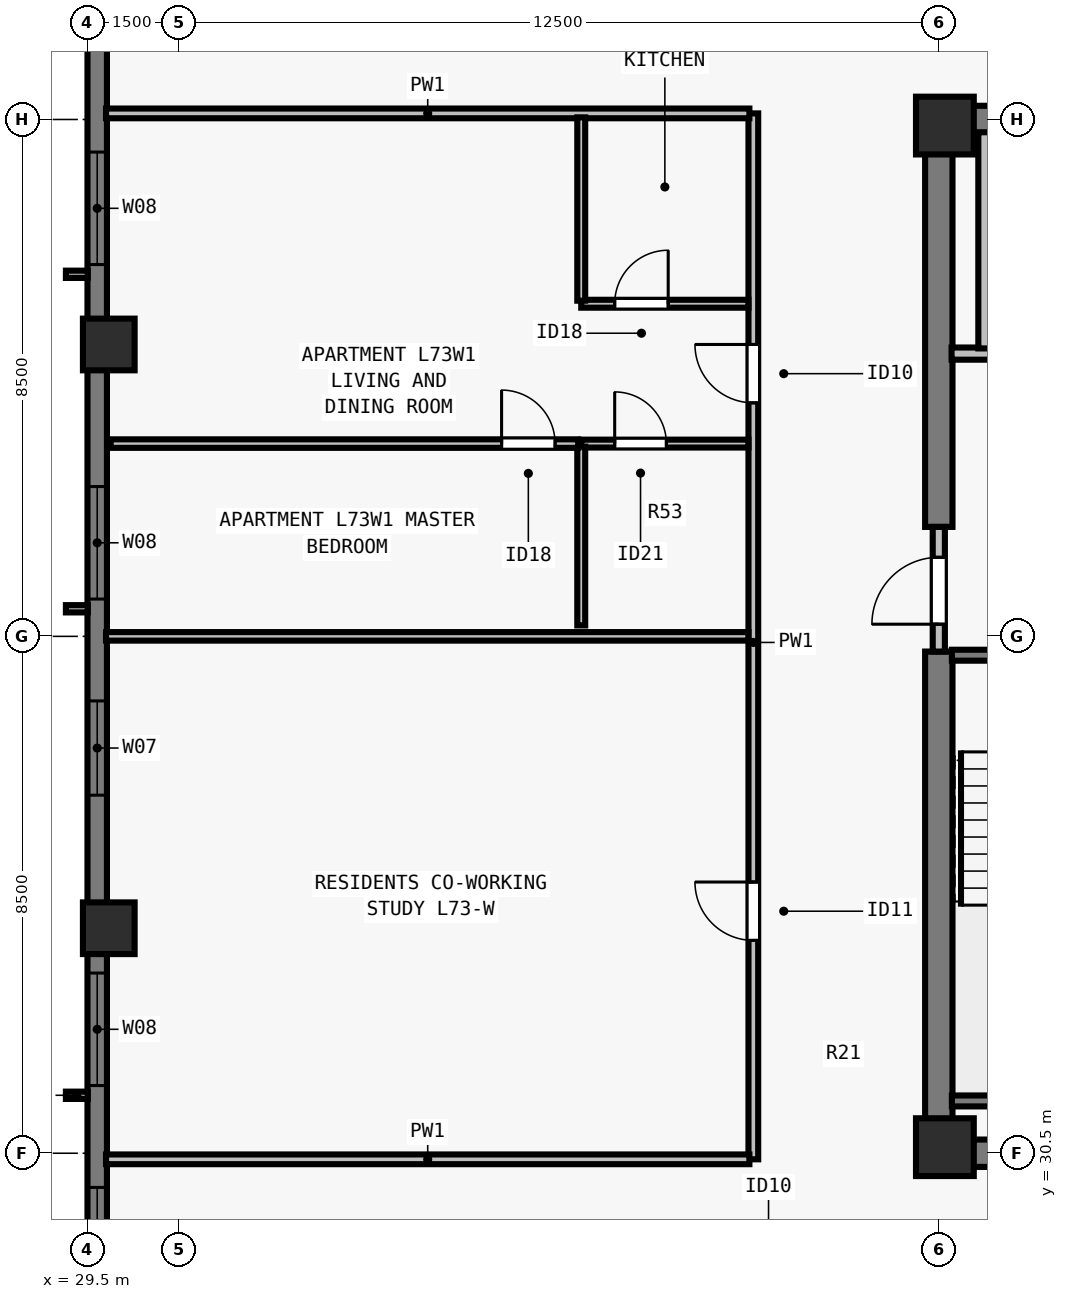
"""IFC4 building model, lengths in metres.
Left out: names, types, materials, properties, quantities, classifications, styles, units other than length and angle.
Written with IfcOpenShell. Run it as: python <this file> out.ifc"""

import sys

from ifc_helpers import new_model, si_unit, direction, frame, frame_2d, origin, origin_2d, place, context, subcontext, project, spatial, rectangle, extrude, element, fill, save


model = new_model("IFC4")
c1 = context("Model", 3, precision=1e-05, world=origin(), true_north=direction((0.0, 1.0)))
c2 = subcontext(c1, "Body", "Model", "MODEL_VIEW")
j1 = project(units=[si_unit("LENGTHUNIT", "METRE"), si_unit("PLANEANGLEUNIT", "RADIAN")], contexts=[c1])
p1 = place(None, origin())
s1 = spatial("IfcSite", under=j1, at=p1, CompositionType="ELEMENT")
p2 = place(p1, origin())
s2 = spatial("IfcBuilding", under=s1, at=p2, CompositionType="ELEMENT")
p3 = place(p2, frame((0.0, 0.0, 265.5)))
s3 = spatial("IfcBuildingStorey", under=s2, at=p3, CompositionType="ELEMENT", Elevation=265.5)
for number, where, z_axis, x_axis in (
    (1, (43.6, 30.6, 0.0), (0.0, 0.0, 1.0), (1.0, 0.0, 0.0)),
    (2, (43.6, 47.4, 0.0), (0.0, 0.0, 1.0), (1.0, 0.0, 0.0)),
):
    element("IfcColumn", number, at=place(p3, frame(where, z_axis=z_axis, x_axis=x_axis)), inside=s3, PredefinedType="COLUMN", context=c2, shape_type="SweptSolid", body=[
        extrude(rectangle(XDim=0.95, YDim=0.95, at=origin_2d()), origin(), (0.0, 0.0, 1.0), 3.5),
    ])
for number, where, z_axis, x_axis in (
    (3, (29.85, 43.8, 0.0), (0.0, 0.0, 1.0), (0.0, 1.0, 0.0)),
    (4, (29.85, 34.2, 0.0), (0.0, 0.0, 1.0), (0.0, 1.0, 0.0)),
):
    element("IfcColumn", number, at=place(p3, frame(where, z_axis=z_axis, x_axis=x_axis)), inside=s3, PredefinedType="COLUMN", context=c2, shape_type="SweptSolid", body=[
        extrude(rectangle(XDim=0.85, YDim=0.85, at=origin_2d()), origin(), (0.0, 0.0, 1.0), 3.5),
    ])
p4 = place(p3, frame((29.66, 21.5, 0.0), z_axis=(0.0, 0.0, 1.0), x_axis=(0.0, 1.0, 0.0)))
e5 = element("IfcWall", 5, at=p4, inside=s3, PredefinedType="SOLIDWALL", context=c2, shape_type="SweptSolid", body=[
    extrude(rectangle(XDim=34.702, YDim=0.32, at=frame_2d((17.351, 0.0))), origin(), (0.0, 0.0, 1.0), 3.29),
])
p5 = place(p4, frame((6.888, 0.0, 0.8)))
e6 = element("IfcOpeningElement", 6, at=p5, cuts=e5, PredefinedType="OPENING", context=c2, shape_type="SweptSolid", body=[
    extrude(rectangle(XDim=1.55, YDim=1.678, at=frame_2d((0.775, 0.839))), frame((0.0, 0.17, 0.0), z_axis=(0.0, -1.0, 0.0), x_axis=(1.0, 0.0, 0.0)), (0.0, 0.0, 1.0), 0.34),
])
p6 = place(p4, frame((10.113, 0.0, 0.8)))
e7 = element("IfcOpeningElement", 7, at=p6, cuts=e5, PredefinedType="OPENING", context=c2, shape_type="SweptSolid", body=[
    extrude(rectangle(XDim=1.85, YDim=1.678, at=frame_2d((0.925, 0.839))), frame((0.0, 0.17, 0.0), z_axis=(0.0, -1.0, 0.0), x_axis=(1.0, 0.0, 0.0)), (0.0, 0.0, 1.0), 0.34),
])
p7 = place(p4, frame((14.888, 0.0, 0.8)))
e8 = element("IfcOpeningElement", 8, at=p7, cuts=e5, PredefinedType="OPENING", context=c2, shape_type="SweptSolid", body=[
    extrude(rectangle(XDim=1.55, YDim=1.678, at=frame_2d((0.775, 0.839))), frame((0.0, 0.17, 0.0), z_axis=(0.0, -1.0, 0.0), x_axis=(1.0, 0.0, 0.0)), (0.0, 0.0, 1.0), 0.34),
])
p8 = place(p4, frame((18.114, 0.0, 0.8)))
e9 = element("IfcOpeningElement", 9, at=p8, cuts=e5, PredefinedType="OPENING", context=c2, shape_type="SweptSolid", body=[
    extrude(rectangle(XDim=1.85, YDim=1.678, at=frame_2d((0.925, 0.839))), frame((0.0, 0.17, 0.0), z_axis=(0.0, -1.0, 0.0), x_axis=(1.0, 0.0, 0.0)), (0.0, 0.0, 1.0), 0.34),
])
p9 = place(p4, frame((23.614, 0.0, 0.8)))
e10 = element("IfcOpeningElement", 10, at=p9, cuts=e5, PredefinedType="OPENING", context=c2, shape_type="SweptSolid", body=[
    extrude(rectangle(XDim=1.85, YDim=1.678, at=frame_2d((0.925, 0.839))), frame((0.0, 0.17, 0.0), z_axis=(0.0, -1.0, 0.0), x_axis=(1.0, 0.0, 0.0)), (0.0, 0.0, 1.0), 0.34),
])
p10 = place(p4, frame((29.24, 0.0, 0.8)))
e11 = element("IfcOpeningElement", 11, at=p10, cuts=e5, PredefinedType="OPENING", context=c2, shape_type="SweptSolid", body=[
    extrude(rectangle(XDim=1.55, YDim=1.678, at=frame_2d((0.775, 0.839))), frame((0.0, 0.17, 0.0), z_axis=(0.0, -1.0, 0.0), x_axis=(1.0, 0.0, 0.0)), (0.0, 0.0, 1.0), 0.34),
])
for number, where, z_axis, x_axis in (
    (12, (43.275, 30.5, 0.0), (0.0, 0.0, 1.0), (1.0, 0.0, 0.0)),
    (13, (43.275, 47.5, 0.0), (0.0, 0.0, 1.0), (1.0, 0.0, 0.0)),
):
    element("IfcWall", number, at=place(p3, frame(where, z_axis=z_axis, x_axis=x_axis)), inside=s3, PredefinedType="SHEAR", context=c2, shape_type="SweptSolid", body=[
        extrude(rectangle(XDim=17.45, YDim=0.45, at=frame_2d((8.725, 0.0))), origin(), (0.0, 0.0, 1.0), 3.29),
    ])
p11 = place(p3, frame((43.5, 30.715, 0.0), z_axis=(0.0, 0.0, 1.0), x_axis=(0.0, 1.0, 0.0)))
e14 = element("IfcWall", 14, at=p11, inside=s3, PredefinedType="SHEAR", context=c2, shape_type="SweptSolid", body=[
    extrude(rectangle(XDim=8.035, YDim=0.45, at=frame_2d((4.018, 0.0))), origin(), (0.0, 0.0, 1.0), 3.29),
])
p12 = place(p3, frame((43.5, 40.8, 0.0), z_axis=(0.0, 0.0, 1.0), x_axis=(0.0, 1.0, 0.0)))
e15 = element("IfcWall", 15, at=p12, inside=s3, PredefinedType="SHEAR", context=c2, shape_type="SweptSolid", body=[
    extrude(rectangle(XDim=6.485, YDim=0.45, at=frame_2d((3.242, 0.0))), origin(), (0.0, 0.0, 1.0), 3.29),
])
p13 = place(p3, frame((43.5, 38.75, 0.0), z_axis=(0.0, 0.0, 1.0), x_axis=(0.0, 1.0, 0.0)))
e16 = element("IfcWall", 16, at=p13, inside=s3, PredefinedType="SOLIDWALL", context=c2, shape_type="SweptSolid", body=[
    extrude(rectangle(XDim=2.05, YDim=0.2, at=frame_2d((1.025, 0.0))), origin(), (0.0, 0.0, 1.0), 3.29),
])
p14 = place(p13, frame((0.45, 0.0, 0.0)))
e17 = element("IfcOpeningElement", 17, at=p14, cuts=e16, PredefinedType="OPENING", context=c2, shape_type="SweptSolid", body=[
    extrude(rectangle(XDim=1.1, YDim=2.15, at=frame_2d((0.55, 1.075))), frame((0.0, 0.11, 0.0), z_axis=(0.0, -1.0, 0.0), x_axis=(1.0, 0.0, 0.0)), (0.0, 0.0, 1.0), 0.22),
])
p15 = place(p3, frame((43.71, 43.65, 0.0), z_axis=(0.0, 0.0, 1.0), x_axis=(1.0, 0.0, 0.0)))
e18 = element("IfcWall", 18, at=p15, inside=s3, PredefinedType="SOLIDWALL", context=c2, shape_type="SweptSolid", body=[
    extrude(rectangle(XDim=3.555, YDim=0.2, at=frame_2d((1.777, 0.0))), origin(), (0.0, 0.0, 1.0), 3.29),
])
p16 = place(p15, frame((1.16, 0.0, 0.0)))
e19 = element("IfcOpeningElement", 19, at=p16, cuts=e18, PredefinedType="OPENING", context=c2, shape_type="SweptSolid", body=[
    extrude(rectangle(XDim=1.1, YDim=2.2, at=frame_2d((0.55, 1.1))), frame((0.0, 0.11, 0.0), z_axis=(0.0, -1.0, 0.0), x_axis=(1.0, 0.0, 0.0)), (0.0, 0.0, 1.0), 0.22),
])
p17 = place(p3, frame((44.25, 43.735, 0.0), z_axis=(0.0, 0.0, 1.0), x_axis=(0.0, 1.0, 0.0)))
e20 = element("IfcWall", 20, at=p17, inside=s3, PredefinedType="SOLIDWALL", context=c2, shape_type="SweptSolid", body=[
    extrude(rectangle(XDim=3.555, YDim=0.2, at=frame_2d((1.777, 0.0))), origin(), (0.0, 0.0, 1.0), 3.29),
])
p18 = place(p3, frame((40.45, 30.4, 0.0), z_axis=(0.0, 0.0, 1.0), x_axis=(0.0, 1.0, 0.0)))
e21 = element("IfcWall", 21, at=p18, inside=s3, PredefinedType="PARTITIONING", context=c2, shape_type="SweptSolid", body=[
    extrude(rectangle(XDim=17.2, YDim=0.16, at=frame_2d((8.6, 0.0))), origin(), (0.0, 0.0, 1.0), 3.29),
])
p19 = place(p18, frame((3.6, 0.0, 0.0)))
e22 = element("IfcOpeningElement", 22, at=p19, cuts=e21, PredefinedType="OPENING", context=c2, shape_type="SweptSolid", body=[
    extrude(rectangle(XDim=0.96, YDim=2.12, at=frame_2d((0.48, 1.06))), frame((0.0, 0.09, 0.0), z_axis=(0.0, -1.0, 0.0), x_axis=(1.0, 0.0, 0.0)), (0.0, 0.0, 1.0), 0.18),
])
p20 = place(p18, frame((12.44, 0.0, 0.0)))
e23 = element("IfcOpeningElement", 23, at=p20, cuts=e21, PredefinedType="OPENING", context=c2, shape_type="SweptSolid", body=[
    extrude(rectangle(XDim=0.96, YDim=2.18, at=frame_2d((0.48, 1.09))), frame((0.0, 0.09, 0.0), z_axis=(0.0, -1.0, 0.0), x_axis=(1.0, 0.0, 0.0)), (0.0, 0.0, 1.0), 0.18),
])
for number, where, z_axis, x_axis in (
    (24, (29.805, 30.4, 0.0), (0.0, 0.0, 1.0), (1.0, 0.0, 0.0)),
    (25, (29.805, 47.6, 0.0), (0.0, 0.0, 1.0), (1.0, 0.0, 0.0)),
):
    element("IfcWall", number, at=place(p3, frame(where, z_axis=z_axis, x_axis=x_axis)), inside=s3, PredefinedType="PARTITIONING", context=c2, shape_type="SweptSolid", body=[
        extrude(rectangle(XDim=10.58, YDim=0.16, at=frame_2d((5.29, 0.0))), origin(), (0.0, 0.0, 1.0), 3.29),
    ])
p21 = place(p3, frame((29.805, 39.0, 0.0), z_axis=(0.0, 0.0, 1.0), x_axis=(1.0, 0.0, 0.0)))
e26 = element("IfcWall", 26, at=p21, inside=s3, PredefinedType="PARTITIONING", context=c2, shape_type="SweptSolid", body=[
    extrude(rectangle(XDim=10.565, YDim=0.14, at=frame_2d((5.283, 0.0))), origin(), (0.0, 0.0, 1.0), 2.958),
])
p22 = place(p3, frame((37.62, 42.17, 0.0), z_axis=(0.0, 0.0, 1.0), x_axis=(1.0, 0.0, 0.0)))
e27 = element("IfcWall", 27, at=p22, inside=s3, PredefinedType="PLUMBINGWALL", context=c2, shape_type="SweptSolid", body=[
    extrude(rectangle(XDim=2.75, YDim=0.13, at=frame_2d((1.375, 0.0))), origin(), (0.0, 0.0, 1.0), 2.958),
])
p23 = place(p22, frame((0.55, 0.0, 0.0)))
e28 = element("IfcOpeningElement", 28, at=p23, cuts=e27, PredefinedType="OPENING", context=c2, shape_type="SweptSolid", body=[
    extrude(rectangle(XDim=0.85, YDim=2.08, at=frame_2d((0.425, 1.04))), frame((0.0, 0.075, 0.0), z_axis=(0.0, -1.0, 0.0), x_axis=(1.0, 0.0, 0.0)), (0.0, 0.0, 1.0), 0.15),
])
p24 = place(p3, frame((37.62, 39.18, 0.0), z_axis=(0.0, 0.0, 1.0), x_axis=(0.0, 1.0, 0.0)))
e29 = element("IfcWall", 29, at=p24, inside=s3, PredefinedType="PLUMBINGWALL", context=c2, shape_type="SweptSolid", body=[
    extrude(rectangle(XDim=2.94, YDim=0.13, at=frame_2d((1.47, 0.0))), origin(), (0.0, 0.0, 1.0), 3.29),
])
p25 = place(p3, frame((37.62, 44.47, 0.0), z_axis=(0.0, 0.0, 1.0), x_axis=(1.0, 0.0, 0.0)))
e30 = element("IfcWall", 30, at=p25, inside=s3, PredefinedType="PLUMBINGWALL", context=c2, shape_type="SweptSolid", body=[
    extrude(rectangle(XDim=2.75, YDim=0.13, at=frame_2d((1.375, 0.0))), origin(), (0.0, 0.0, 1.0), 3.29),
])
p26 = place(p25, frame((0.55, 0.0, 0.0)))
e31 = element("IfcOpeningElement", 31, at=p26, cuts=e30, PredefinedType="OPENING", context=c2, shape_type="SweptSolid", body=[
    extrude(rectangle(XDim=0.88, YDim=2.1, at=frame_2d((0.44, 1.05))), frame((0.0, 0.075, 0.0), z_axis=(0.0, -1.0, 0.0), x_axis=(1.0, 0.0, 0.0)), (0.0, 0.0, 1.0), 0.15),
])
p27 = place(p3, frame((37.62, 44.52, 0.0), z_axis=(0.0, 0.0, 1.0), x_axis=(0.0, 1.0, 0.0)))
e32 = element("IfcWall", 32, at=p27, inside=s3, PredefinedType="PLUMBINGWALL", context=c2, shape_type="SweptSolid", body=[
    extrude(rectangle(XDim=3.015, YDim=0.13, at=frame_2d((1.507, 0.0))), origin(), (0.0, 0.0, 1.0), 3.29),
])
p28 = place(p3, frame((29.88, 42.17, 0.0), z_axis=(0.0, 0.0, 1.0), x_axis=(1.0, 0.0, 0.0)))
e33 = element("IfcWall", 33, at=p28, inside=s3, PredefinedType="PARTITIONING", context=c2, shape_type="SweptSolid", body=[
    extrude(rectangle(XDim=7.69, YDim=0.14, at=frame_2d((3.845, 0.0))), origin(), (0.0, 0.0, 1.0), 3.29),
])
p29 = place(p28, frame((6.43, 0.0, 0.0)))
e34 = element("IfcOpeningElement", 34, at=p29, cuts=e33, PredefinedType="OPENING", context=c2, shape_type="SweptSolid", body=[
    extrude(rectangle(XDim=0.88, YDim=2.1, at=frame_2d((0.44, 1.05))), frame((0.0, 0.08, 0.0), z_axis=(0.0, -1.0, 0.0), x_axis=(1.0, 0.0, 0.0)), (0.0, 0.0, 1.0), 0.16),
])
p30 = place(p3, frame((43.715, 38.69, 0.0), z_axis=(0.0, 0.0, 1.0), x_axis=(1.0, 0.0, 0.0)))
e35 = element("IfcWall", 35, at=p30, inside=s3, PredefinedType="SOLIDWALL", context=c2, shape_type="SweptSolid", body=[
    extrude(rectangle(XDim=3.28, YDim=0.18, at=frame_2d((1.64, 0.0))), origin(), (0.0, 0.0, 1.0), 3.29),
])
p31 = place(p30, frame((1.165, 0.0, 0.0)))
e36 = element("IfcOpeningElement", 36, at=p31, cuts=e35, PredefinedType="OPENING", context=c2, shape_type="SweptSolid", body=[
    extrude(rectangle(XDim=0.95, YDim=2.15, at=frame_2d((0.475, 1.075))), frame((0.0, 0.1, 0.0), z_axis=(0.0, -1.0, 0.0), x_axis=(1.0, 0.0, 0.0)), (0.0, 0.0, 1.0), 0.2),
])
p32 = place(p3, frame((43.715, 31.36, 0.0), z_axis=(0.0, 0.0, 1.0), x_axis=(1.0, 0.0, 0.0)))
e37 = element("IfcWall", 37, at=p32, inside=s3, PredefinedType="SOLIDWALL", context=c2, shape_type="SweptSolid", body=[
    extrude(rectangle(XDim=3.28, YDim=0.18, at=frame_2d((1.64, 0.0))), origin(), (0.0, 0.0, 1.0), 3.29),
])
p33 = place(p5, origin())
e38 = element("IfcWindow", 38, at=p33, inside=s3, PartitioningType="SINGLE_PANEL", PredefinedType="WINDOW", context=c2, shape_type="SweptSolid", body=[
    extrude(rectangle(XDim=1.55, YDim=1.678, at=frame_2d((0.775, 0.839))), frame((0.0, -0.05, 0.0), z_axis=(0.0, -1.0, 0.0), x_axis=(1.0, 0.0, 0.0)), (0.0, 0.0, 1.0), 0.06),
])
fill(e6, e38)
p34 = place(p6, origin())
e39 = element("IfcWindow", 39, at=p34, inside=s3, PartitioningType="SINGLE_PANEL", PredefinedType="WINDOW", context=c2, shape_type="SweptSolid", body=[
    extrude(rectangle(XDim=1.85, YDim=1.678, at=frame_2d((0.925, 0.839))), frame((0.0, -0.05, 0.0), z_axis=(0.0, -1.0, 0.0), x_axis=(1.0, 0.0, 0.0)), (0.0, 0.0, 1.0), 0.06),
])
fill(e7, e39)
p35 = place(p7, origin())
e40 = element("IfcWindow", 40, at=p35, inside=s3, PartitioningType="SINGLE_PANEL", PredefinedType="WINDOW", context=c2, shape_type="SweptSolid", body=[
    extrude(rectangle(XDim=1.55, YDim=1.678, at=frame_2d((0.775, 0.839))), frame((0.0, -0.05, 0.0), z_axis=(0.0, -1.0, 0.0), x_axis=(1.0, 0.0, 0.0)), (0.0, 0.0, 1.0), 0.06),
])
fill(e8, e40)
p36 = place(p8, origin())
e41 = element("IfcWindow", 41, at=p36, inside=s3, PartitioningType="SINGLE_PANEL", PredefinedType="WINDOW", context=c2, shape_type="SweptSolid", body=[
    extrude(rectangle(XDim=1.85, YDim=1.678, at=frame_2d((0.925, 0.839))), frame((0.0, -0.05, 0.0), z_axis=(0.0, -1.0, 0.0), x_axis=(1.0, 0.0, 0.0)), (0.0, 0.0, 1.0), 0.06),
])
fill(e9, e41)
p37 = place(p9, origin())
e42 = element("IfcWindow", 42, at=p37, inside=s3, PartitioningType="SINGLE_PANEL", PredefinedType="WINDOW", context=c2, shape_type="SweptSolid", body=[
    extrude(rectangle(XDim=1.85, YDim=1.678, at=frame_2d((0.925, 0.839))), frame((0.0, -0.05, 0.0), z_axis=(0.0, -1.0, 0.0), x_axis=(1.0, 0.0, 0.0)), (0.0, 0.0, 1.0), 0.06),
])
fill(e10, e42)
p38 = place(p14, origin())
e43 = element("IfcDoor", 43, at=p38, inside=s3, OperationType="SINGLE_SWING_LEFT", PredefinedType="DOOR", context=c2, shape_type="SweptSolid", body=[
    extrude(rectangle(XDim=1.1, YDim=2.15, at=frame_2d((0.55, 1.075))), frame((0.0, 0.025, 0.0), z_axis=(0.0, -1.0, 0.0), x_axis=(1.0, 0.0, 0.0)), (0.0, 0.0, 1.0), 0.05),
])
fill(e17, e43)
p39 = place(p19, origin())
e44 = element("IfcDoor", 44, at=p39, inside=s3, OperationType="SINGLE_SWING_RIGHT", PredefinedType="DOOR", context=c2, shape_type="SweptSolid", body=[
    extrude(rectangle(XDim=0.96, YDim=2.12, at=frame_2d((0.48, 1.06))), frame((0.0, 0.025, 0.0), z_axis=(0.0, -1.0, 0.0), x_axis=(1.0, 0.0, 0.0)), (0.0, 0.0, 1.0), 0.05),
])
fill(e22, e44)
p40 = place(p23, origin())
e45 = element("IfcDoor", 45, at=p40, inside=s3, OperationType="SINGLE_SWING_LEFT", PredefinedType="DOOR", context=c2, shape_type="SweptSolid", body=[
    extrude(rectangle(XDim=0.85, YDim=2.08, at=frame_2d((0.425, 1.04))), frame((0.0, 0.025, 0.0), z_axis=(0.0, -1.0, 0.0), x_axis=(1.0, 0.0, 0.0)), (0.0, 0.0, 1.0), 0.05),
])
fill(e28, e45)
p41 = place(p26, origin())
e46 = element("IfcDoor", 46, at=p41, inside=s3, OperationType="SINGLE_SWING_RIGHT", PredefinedType="DOOR", context=c2, shape_type="SweptSolid", body=[
    extrude(rectangle(XDim=0.88, YDim=2.1, at=frame_2d((0.44, 1.05))), frame((0.0, 0.025, 0.0), z_axis=(0.0, -1.0, 0.0), x_axis=(1.0, 0.0, 0.0)), (0.0, 0.0, 1.0), 0.05),
])
fill(e31, e46)
p42 = place(p29, origin())
e47 = element("IfcDoor", 47, at=p42, inside=s3, OperationType="SINGLE_SWING_LEFT", PredefinedType="DOOR", context=c2, shape_type="SweptSolid", body=[
    extrude(rectangle(XDim=0.88, YDim=2.1, at=frame_2d((0.44, 1.05))), frame((0.0, 0.025, 0.0), z_axis=(0.0, -1.0, 0.0), x_axis=(1.0, 0.0, 0.0)), (0.0, 0.0, 1.0), 0.05),
])
fill(e34, e47)
p43 = place(p20, origin())
e48 = element("IfcDoor", 48, at=p43, inside=s3, OperationType="SINGLE_SWING_RIGHT", PredefinedType="DOOR", context=c2, shape_type="SweptSolid", body=[
    extrude(rectangle(XDim=0.96, YDim=2.18, at=frame_2d((0.48, 1.09))), frame((0.0, 0.025, 0.0), z_axis=(0.0, -1.0, 0.0), x_axis=(1.0, 0.0, 0.0)), (0.0, 0.0, 1.0), 0.05),
])
fill(e23, e48)
save(model, sys.argv[1])
